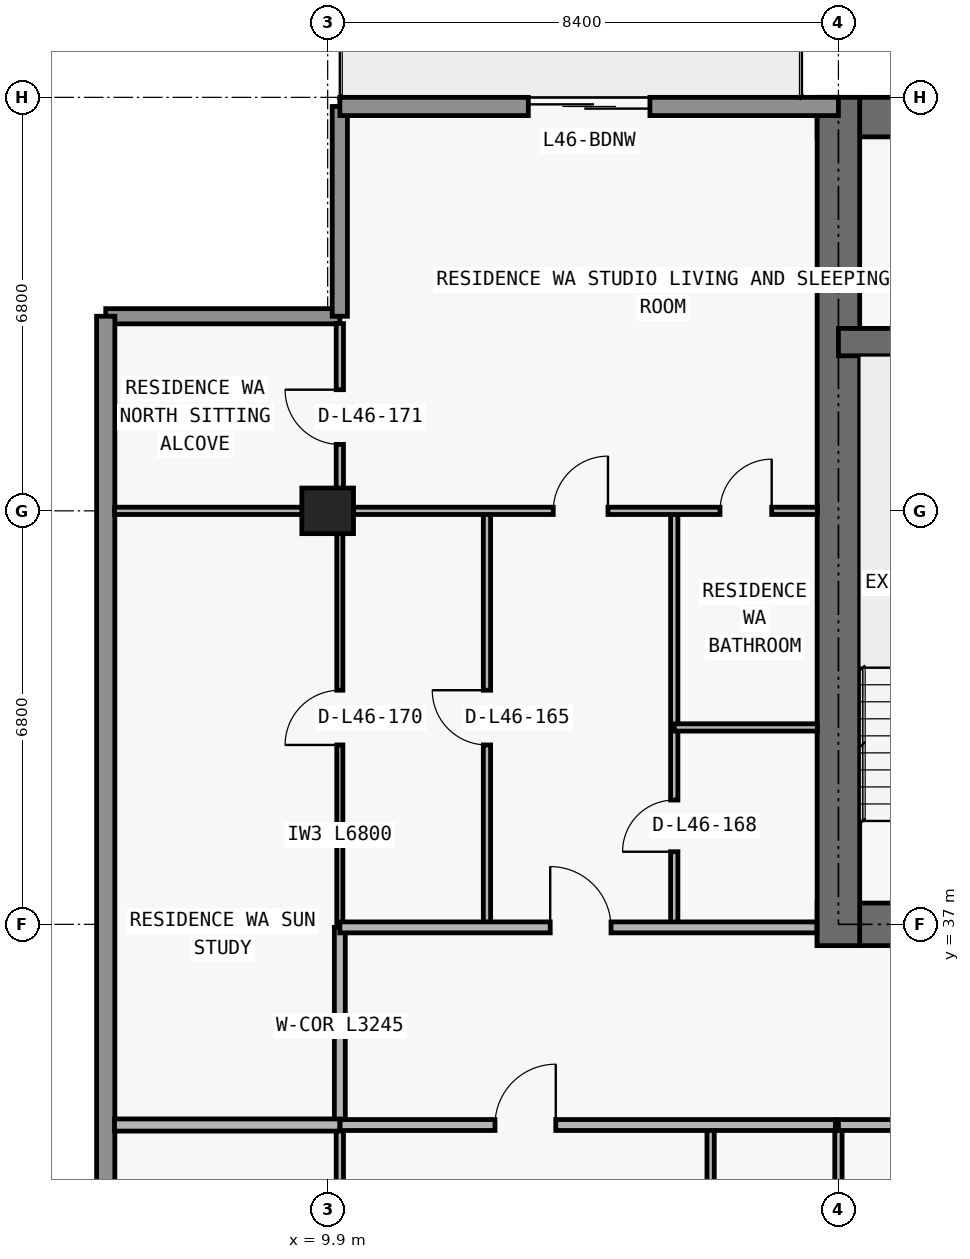
"""IFC4 building model, lengths in metres.
Left out: names, types, materials, properties, quantities, classifications, styles, units other than length and angle.
Written with IfcOpenShell. Run it as: python <this file> out.ifc"""

import sys

from ifc_helpers import new_model, si_unit, direction, frame, frame_2d, origin, origin_2d, place, context, subcontext, project, spatial, rectangle, extrude, element, fill, save


model = new_model("IFC4")
c1 = context("Model", 3, precision=1e-05, world=origin(), true_north=direction((0.0, 1.0)))
c2 = subcontext(c1, "Body", "Model", "MODEL_VIEW")
j1 = project(units=[si_unit("LENGTHUNIT", "METRE"), si_unit("PLANEANGLEUNIT", "RADIAN")], contexts=[c1])
p1 = place(None, origin())
s1 = spatial("IfcSite", under=j1, at=p1, CompositionType="ELEMENT")
p2 = place(p1, origin())
s2 = spatial("IfcBuilding", under=s1, at=p2, CompositionType="ELEMENT")
p3 = place(p2, frame((0.0, 0.0, 167.1)))
s3 = spatial("IfcBuildingStorey", under=s2, at=p3, CompositionType="ELEMENT", Elevation=167.1)
p4 = place(p3, frame((9.9, 43.8, 0.0), z_axis=(0.0, 0.0, 1.0), x_axis=(1.0, 0.0, 0.0)))
e1 = element("IfcColumn", 1, at=p4, inside=s3, PredefinedType="COLUMN", context=c2, shape_type="SweptSolid", body=[
    extrude(rectangle(XDim=0.85, YDim=0.75, at=origin_2d()), origin(), (0.0, 0.0, 1.0), 3.05),
])
p5 = place(p3, frame((17.95, 37.0, 0.0), z_axis=(0.0, 0.0, 1.0), x_axis=(1.0, 0.0, 0.0)))
e2 = element("IfcWall", 2, at=p5, inside=s3, PredefinedType="SHEAR", context=c2, shape_type="SweptSolid", body=[
    extrude(rectangle(XDim=41.9, YDim=0.7, at=frame_2d((20.95, 0.0))), origin(), (0.0, 0.0, 1.0), 3.05),
])
p6 = place(p5, frame((14.35, 0.0, 0.0)))
e3 = element("IfcOpeningElement", 3, at=p6, cuts=e2, PredefinedType="OPENING", context=c2, shape_type="SweptSolid", body=[
    extrude(rectangle(XDim=1.1, YDim=2.15, at=frame_2d((0.55, 1.075))), frame((0.0, 0.36, 0.0), z_axis=(0.0, -1.0, 0.0), x_axis=(1.0, 0.0, 0.0)), (0.0, 0.0, 1.0), 0.72),
])
p7 = place(p5, frame((6.2, 0.0, 0.0)))
e4 = element("IfcOpeningElement", 4, at=p7, cuts=e2, PredefinedType="OPENING", context=c2, shape_type="SweptSolid", body=[
    extrude(rectangle(XDim=1.05, YDim=2.15, at=frame_2d((0.525, 1.075))), frame((0.0, 0.36, 0.0), z_axis=(0.0, -1.0, 0.0), x_axis=(1.0, 0.0, 0.0)), (0.0, 0.0, 1.0), 0.72),
])
p8 = place(p5, frame((34.7, 0.0, 0.0)))
e5 = element("IfcOpeningElement", 5, at=p8, cuts=e2, PredefinedType="OPENING", context=c2, shape_type="SweptSolid", body=[
    extrude(rectangle(XDim=1.05, YDim=2.15, at=frame_2d((0.525, 1.075))), frame((0.0, 0.36, 0.0), z_axis=(0.0, -1.0, 0.0), x_axis=(1.0, 0.0, 0.0)), (0.0, 0.0, 1.0), 0.72),
])
p9 = place(p5, frame((10.812, 0.0, 0.0)))
e6 = element("IfcOpeningElement", 6, at=p9, cuts=e2, PredefinedType="OPENING", context=c2, shape_type="SweptSolid", body=[
    extrude(rectangle(XDim=1.05, YDim=2.15, at=frame_2d((0.525, 1.075))), frame((0.0, 0.36, 0.0), z_axis=(0.0, -1.0, 0.0), x_axis=(1.0, 0.0, 0.0)), (0.0, 0.0, 1.0), 0.72),
])
p10 = place(p5, frame((24.05, 0.0, 0.0)))
e7 = element("IfcOpeningElement", 7, at=p10, cuts=e2, PredefinedType="OPENING", context=c2, shape_type="SweptSolid", body=[
    extrude(rectangle(XDim=1.05, YDim=2.15, at=frame_2d((0.525, 1.075))), frame((0.0, 0.36, 0.0), z_axis=(0.0, -1.0, 0.0), x_axis=(1.0, 0.0, 0.0)), (0.0, 0.0, 1.0), 0.72),
])
p11 = place(p3, frame((17.95, 50.275, 0.0), z_axis=(0.0, 0.0, 1.0), x_axis=(1.0, 0.0, 0.0)))
e8 = element("IfcWall", 8, at=p11, inside=s3, PredefinedType="SHEAR", context=c2, shape_type="SweptSolid", body=[
    extrude(rectangle(XDim=41.9, YDim=0.65, at=frame_2d((20.95, 0.0))), origin(), (0.0, 0.0, 1.0), 3.05),
])
p12 = place(p3, frame((18.3, 36.65, 0.0), z_axis=(0.0, 0.0, 1.0), x_axis=(0.0, 1.0, 0.0)))
e9 = element("IfcWall", 9, at=p12, inside=s3, PredefinedType="SHEAR", context=c2, shape_type="SweptSolid", body=[
    extrude(rectangle(XDim=13.95, YDim=0.7, at=frame_2d((6.975, 0.0))), origin(), (0.0, 0.0, 1.0), 3.05),
])
p13 = place(p3, frame((18.3, 46.575, 0.0), z_axis=(0.0, 0.0, 1.0), x_axis=(1.0, 0.0, 0.0)))
e10 = element("IfcWall", 10, at=p13, inside=s3, PredefinedType="SHEAR", context=c2, shape_type="SweptSolid", body=[
    extrude(rectangle(XDim=41.2, YDim=0.45, at=frame_2d((20.6, 0.0))), origin(), (0.0, 0.0, 1.0), 3.05),
])
p14 = place(p13, frame((7.575, 0.0, 0.0)))
e11 = element("IfcOpeningElement", 11, at=p14, cuts=e10, PredefinedType="OPENING", context=c2, shape_type="SweptSolid", body=[
    extrude(rectangle(XDim=1.05, YDim=2.15, at=frame_2d((0.525, 1.075))), frame((0.0, 0.235, 0.0), z_axis=(0.0, -1.0, 0.0), x_axis=(1.0, 0.0, 0.0)), (0.0, 0.0, 1.0), 0.47),
])
p15 = place(p13, frame((32.625, 0.0, 0.0)))
e12 = element("IfcOpeningElement", 12, at=p15, cuts=e10, PredefinedType="OPENING", context=c2, shape_type="SweptSolid", body=[
    extrude(rectangle(XDim=1.05, YDim=2.15, at=frame_2d((0.525, 1.075))), frame((0.0, 0.235, 0.0), z_axis=(0.0, -1.0, 0.0), x_axis=(1.0, 0.0, 0.0)), (0.0, 0.0, 1.0), 0.47),
])
p16 = place(p3, frame((6.25, 47.0, 0.0), z_axis=(0.0, 0.0, 1.0), x_axis=(1.0, 0.0, 0.0)))
e13 = element("IfcWall", 13, at=p16, inside=s3, PredefinedType="ELEMENTEDWALL", context=c2, shape_type="SweptSolid", body=[
    extrude(rectangle(XDim=3.85, YDim=0.25, at=frame_2d((1.925, 0.0))), origin(), (0.0, 0.0, 1.0), 3.05),
])
p17 = place(p3, frame((10.1, 47.0, 0.0), z_axis=(0.0, 0.0, 1.0), x_axis=(0.0, 1.0, 0.0)))
e14 = element("IfcWall", 14, at=p17, inside=s3, PredefinedType="ELEMENTEDWALL", context=c2, shape_type="SweptSolid", body=[
    extrude(rectangle(XDim=3.45, YDim=0.25, at=frame_2d((1.725, 0.0))), origin(), (0.0, 0.0, 1.0), 3.05),
])
p18 = place(p3, frame((6.25, 29.1, 0.0), z_axis=(0.0, 0.0, 1.0), x_axis=(0.0, 1.0, 0.0)))
e15 = element("IfcWall", 15, at=p18, inside=s3, PredefinedType="STANDARD", context=c2, shape_type="SweptSolid", body=[
    extrude(rectangle(XDim=17.9, YDim=0.3, at=frame_2d((8.95, 0.0))), origin(), (0.0, 0.0, 1.0), 3.05),
])
p19 = place(p3, frame((10.1, 50.45, 0.0), z_axis=(0.0, 0.0, 1.0), x_axis=(1.0, 0.0, 0.0)))
e16 = element("IfcWall", 16, at=p19, inside=s3, PredefinedType="STANDARD", context=c2, shape_type="SweptSolid", body=[
    extrude(rectangle(XDim=8.2, YDim=0.3, at=frame_2d((4.1, 0.0))), origin(), (0.0, 0.0, 1.0), 3.05),
])
p20 = place(p19, frame((3.1, 0.0, 0.0)))
e17 = element("IfcOpeningElement", 17, at=p20, cuts=e16, PredefinedType="OPENING", context=c2, shape_type="SweptSolid", body=[
    extrude(rectangle(XDim=2.0, YDim=2.3, at=frame_2d((1.0, 1.15))), frame((0.0, 0.16, 0.0), z_axis=(0.0, -1.0, 0.0), x_axis=(1.0, 0.0, 0.0)), (0.0, 0.0, 1.0), 0.32),
])
p21 = place(p3, frame((10.1, 29.44, 0.0), z_axis=(0.0, 0.0, 1.0), x_axis=(0.0, 1.0, 0.0)))
e18 = element("IfcWall", 18, at=p21, inside=s3, PredefinedType="PARTITIONING", context=c2, shape_type="SweptSolid", body=[
    extrude(rectangle(XDim=4.26, YDim=0.12, at=frame_2d((2.13, 0.0))), origin(), (0.0, 0.0, 1.0), 2.263),
])
p22 = place(p3, frame((10.1, 33.705, 0.0), z_axis=(0.0, 0.0, 1.0), x_axis=(0.0, 1.0, 0.0)))
e19 = element("IfcWall", 19, at=p22, inside=s3, PredefinedType="PARTITIONING", context=c2, shape_type="SweptSolid", body=[
    extrude(rectangle(XDim=3.245, YDim=0.18, at=frame_2d((1.623, 0.0))), origin(), (0.0, 0.0, 1.0), 2.263),
])
p23 = place(p3, frame((10.1, 37.0, 0.0), z_axis=(0.0, 0.0, 1.0), x_axis=(0.0, 1.0, 0.0)))
e20 = element("IfcWall", 20, at=p23, inside=s3, PredefinedType="MOVABLE", context=c2, shape_type="SweptSolid", body=[
    extrude(rectangle(XDim=6.8, YDim=0.1, at=frame_2d((3.4, 0.0))), origin(), (0.0, 0.0, 1.0), 2.263),
])
p24 = place(p23, frame((2.95, 0.0, 0.0)))
e21 = element("IfcOpeningElement", 21, at=p24, cuts=e20, PredefinedType="OPENING", context=c2, shape_type="SweptSolid", body=[
    extrude(rectangle(XDim=0.9, YDim=2.15, at=frame_2d((0.45, 1.075))), frame((0.0, 0.06, 0.0), z_axis=(0.0, -1.0, 0.0), x_axis=(1.0, 0.0, 0.0)), (0.0, 0.0, 1.0), 0.12),
])
p25 = place(p3, frame((10.1, 43.805, 0.0), z_axis=(0.0, 0.0, 1.0), x_axis=(0.0, 1.0, 0.0)))
e22 = element("IfcWall", 22, at=p25, inside=s3, PredefinedType="PARTITIONING", context=c2, shape_type="SweptSolid", body=[
    extrude(rectangle(XDim=3.075, YDim=0.12, at=frame_2d((1.538, 0.0))), origin(), (0.0, 0.0, 1.0), 3.05),
])
p26 = place(p25, frame((1.087, 0.0, 0.0)))
e23 = element("IfcOpeningElement", 23, at=p26, cuts=e22, PredefinedType="OPENING", context=c2, shape_type="SweptSolid", body=[
    extrude(rectangle(XDim=0.9, YDim=2.15, at=frame_2d((0.45, 1.075))), frame((0.0, 0.07, 0.0), z_axis=(0.0, -1.0, 0.0), x_axis=(1.0, 0.0, 0.0)), (0.0, 0.0, 1.0), 0.14),
])
p27 = place(p3, frame((12.52, 37.0, 0.0), z_axis=(0.0, 0.0, 1.0), x_axis=(0.0, 1.0, 0.0)))
e24 = element("IfcWall", 24, at=p27, inside=s3, PredefinedType="PARTITIONING", context=c2, shape_type="SweptSolid", body=[
    extrude(rectangle(XDim=6.8, YDim=0.12, at=frame_2d((3.4, 0.0))), origin(), (0.0, 0.0, 1.0), 3.05),
])
p28 = place(p27, frame((2.95, 0.0, 0.0)))
e25 = element("IfcOpeningElement", 25, at=p28, cuts=e24, PredefinedType="OPENING", context=c2, shape_type="SweptSolid", body=[
    extrude(rectangle(XDim=0.9, YDim=2.15, at=frame_2d((0.45, 1.075))), frame((0.0, 0.07, 0.0), z_axis=(0.0, -1.0, 0.0), x_axis=(1.0, 0.0, 0.0)), (0.0, 0.0, 1.0), 0.14),
])
p29 = place(p3, frame((15.6, 37.0, 0.0), z_axis=(0.0, 0.0, 1.0), x_axis=(0.0, 1.0, 0.0)))
e26 = element("IfcWall", 26, at=p29, inside=s3, PredefinedType="PARTITIONING", context=c2, shape_type="SweptSolid", body=[
    extrude(rectangle(XDim=6.8, YDim=0.12, at=frame_2d((3.4, 0.0))), origin(), (0.0, 0.0, 1.0), 3.05),
])
p30 = place(p29, frame((1.194, 0.0, 0.0)))
e27 = element("IfcOpeningElement", 27, at=p30, cuts=e26, PredefinedType="OPENING", context=c2, shape_type="SweptSolid", body=[
    extrude(rectangle(XDim=0.85, YDim=2.1, at=frame_2d((0.425, 1.05))), frame((0.0, 0.07, 0.0), z_axis=(0.0, -1.0, 0.0), x_axis=(1.0, 0.0, 0.0)), (0.0, 0.0, 1.0), 0.14),
])
p31 = place(p3, frame((16.198, 29.44, 0.0), z_axis=(0.0, 0.0, 1.0), x_axis=(0.0, 1.0, 0.0)))
e28 = element("IfcWall", 28, at=p31, inside=s3, PredefinedType="PARTITIONING", context=c2, shape_type="SweptSolid", body=[
    extrude(rectangle(XDim=4.26, YDim=0.12, at=frame_2d((2.13, 0.0))), origin(), (0.0, 0.0, 1.0), 3.05),
])
p32 = place(p31, frame((1.705, 0.0, 0.0)))
e29 = element("IfcOpeningElement", 29, at=p32, cuts=e28, PredefinedType="OPENING", context=c2, shape_type="SweptSolid", body=[
    extrude(rectangle(XDim=0.85, YDim=2.1, at=frame_2d((0.425, 1.05))), frame((0.0, 0.07, 0.0), z_axis=(0.0, -1.0, 0.0), x_axis=(1.0, 0.0, 0.0)), (0.0, 0.0, 1.0), 0.14),
])
p33 = place(p3, frame((18.3, 29.44, 0.0), z_axis=(0.0, 0.0, 1.0), x_axis=(0.0, 1.0, 0.0)))
e30 = element("IfcWall", 30, at=p33, inside=s3, PredefinedType="PARTITIONING", context=c2, shape_type="SweptSolid", body=[
    extrude(rectangle(XDim=4.26, YDim=0.12, at=frame_2d((2.13, 0.0))), origin(), (0.0, 0.0, 1.0), 2.263),
])
p34 = place(p3, frame((6.395, 33.7, 0.0), z_axis=(0.0, 0.0, 1.0), x_axis=(1.0, 0.0, 0.0)))
e31 = element("IfcWall", 31, at=p34, inside=s3, PredefinedType="PARTITIONING", context=c2, shape_type="SweptSolid", body=[
    extrude(rectangle(XDim=3.705, YDim=0.2, at=frame_2d((1.853, 0.0))), origin(), (0.0, 0.0, 1.0), 3.05),
])
p35 = place(p3, frame((10.105, 33.7, 0.0), z_axis=(0.0, 0.0, 1.0), x_axis=(1.0, 0.0, 0.0)))
e32 = element("IfcWall", 32, at=p35, inside=s3, PredefinedType="PARTITIONING", context=c2, shape_type="SweptSolid", body=[
    extrude(rectangle(XDim=8.145, YDim=0.18, at=frame_2d((4.073, 0.0))), origin(), (0.0, 0.0, 1.0), 3.05),
])
p36 = place(p35, frame((2.546, 0.0, 0.0)))
e33 = element("IfcOpeningElement", 33, at=p36, cuts=e32, PredefinedType="OPENING", context=c2, shape_type="SweptSolid", body=[
    extrude(rectangle(XDim=1.0, YDim=2.2, at=frame_2d((0.5, 1.1))), frame((0.0, 0.1, 0.0), z_axis=(0.0, -1.0, 0.0), x_axis=(1.0, 0.0, 0.0)), (0.0, 0.0, 1.0), 0.2),
])
p37 = place(p3, frame((18.3, 33.7, 0.0), z_axis=(0.0, 0.0, 1.0), x_axis=(1.0, 0.0, 0.0)))
e34 = element("IfcWall", 34, at=p37, inside=s3, PredefinedType="PARTITIONING", context=c2, shape_type="SweptSolid", body=[
    extrude(rectangle(XDim=8.35, YDim=0.18, at=frame_2d((4.175, 0.0))), origin(), (0.0, 0.0, 1.0), 3.05),
])
p38 = place(p3, frame((10.1, 36.95, 0.0), z_axis=(0.0, 0.0, 1.0), x_axis=(1.0, 0.0, 0.0)))
e35 = element("IfcWall", 35, at=p38, inside=s3, PredefinedType="PARTITIONING", context=c2, shape_type="SweptSolid", body=[
    extrude(rectangle(XDim=7.845, YDim=0.18, at=frame_2d((3.922, 0.0))), origin(), (0.0, 0.0, 1.0), 3.05),
])
p39 = place(p38, frame((3.46, 0.0, 0.0)))
e36 = element("IfcOpeningElement", 36, at=p39, cuts=e35, PredefinedType="OPENING", context=c2, shape_type="SweptSolid", body=[
    extrude(rectangle(XDim=1.0, YDim=2.2, at=frame_2d((0.5, 1.1))), frame((0.0, 0.1, 0.0), z_axis=(0.0, -1.0, 0.0), x_axis=(1.0, 0.0, 0.0)), (0.0, 0.0, 1.0), 0.2),
])
p40 = place(p3, frame((15.6, 40.238, 0.0), z_axis=(0.0, 0.0, 1.0), x_axis=(1.0, 0.0, 0.0)))
e37 = element("IfcWall", 37, at=p40, inside=s3, PredefinedType="PARTITIONING", context=c2, shape_type="SweptSolid", body=[
    extrude(rectangle(XDim=2.355, YDim=0.12, at=frame_2d((1.177, 0.0))), origin(), (0.0, 0.0, 1.0), 3.05),
])
p41 = place(p3, frame((6.395, 43.8, 0.0), z_axis=(0.0, 0.0, 1.0), x_axis=(1.0, 0.0, 0.0)))
e38 = element("IfcWall", 38, at=p41, inside=s3, PredefinedType="PARTITIONING", context=c2, shape_type="SweptSolid", body=[
    extrude(rectangle(XDim=11.56, YDim=0.12, at=frame_2d((5.78, 0.0))), origin(), (0.0, 0.0, 1.0), 2.418),
])
p42 = place(p41, frame((7.215, 0.0, 0.0)))
e39 = element("IfcOpeningElement", 39, at=p42, cuts=e38, PredefinedType="OPENING", context=c2, shape_type="SweptSolid", body=[
    extrude(rectangle(XDim=0.9, YDim=2.15, at=frame_2d((0.45, 1.075))), frame((0.0, 0.07, 0.0), z_axis=(0.0, -1.0, 0.0), x_axis=(1.0, 0.0, 0.0)), (0.0, 0.0, 1.0), 0.14),
])
p43 = place(p41, frame((9.958, 0.0, 0.0)))
e40 = element("IfcOpeningElement", 40, at=p43, cuts=e38, PredefinedType="OPENING", context=c2, shape_type="SweptSolid", body=[
    extrude(rectangle(XDim=0.85, YDim=2.1, at=frame_2d((0.425, 1.05))), frame((0.0, 0.07, 0.0), z_axis=(0.0, -1.0, 0.0), x_axis=(1.0, 0.0, 0.0)), (0.0, 0.0, 1.0), 0.14),
])
p44 = place(p20, origin())
e41 = element("IfcDoor", 41, at=p44, inside=s3, OperationType="DOUBLE_DOOR_SLIDING", PredefinedType="DOOR", context=c2, shape_type="SweptSolid", body=[
    extrude(rectangle(XDim=2.0, YDim=2.3, at=frame_2d((1.0, 1.15))), frame((0.0, 0.025, 0.0), z_axis=(0.0, -1.0, 0.0), x_axis=(1.0, 0.0, 0.0)), (0.0, 0.0, 1.0), 0.05),
])
fill(e17, e41)
p45 = place(p36, origin())
e42 = element("IfcDoor", 42, at=p45, inside=s3, OperationType="SINGLE_SWING_RIGHT", PredefinedType="DOOR", context=c2, shape_type="SweptSolid", body=[
    extrude(rectangle(XDim=1.0, YDim=2.2, at=frame_2d((0.5, 1.1))), frame((0.0, 0.025, 0.0), z_axis=(0.0, -1.0, 0.0), x_axis=(1.0, 0.0, 0.0)), (0.0, 0.0, 1.0), 0.05),
])
fill(e33, e42)
p46 = place(p28, origin())
e43 = element("IfcDoor", 43, at=p46, inside=s3, OperationType="SINGLE_SWING_RIGHT", PredefinedType="DOOR", context=c2, shape_type="SweptSolid", body=[
    extrude(rectangle(XDim=0.9, YDim=2.15, at=frame_2d((0.45, 1.075))), frame((0.0, 0.025, 0.0), z_axis=(0.0, -1.0, 0.0), x_axis=(1.0, 0.0, 0.0)), (0.0, 0.0, 1.0), 0.05),
])
fill(e25, e43)
p47 = place(p39, origin())
e44 = element("IfcDoor", 44, at=p47, inside=s3, OperationType="SINGLE_SWING_LEFT", PredefinedType="DOOR", context=c2, shape_type="SweptSolid", body=[
    extrude(rectangle(XDim=1.0, YDim=2.2, at=frame_2d((0.5, 1.1))), frame((0.0, 0.025, 0.0), z_axis=(0.0, -1.0, 0.0), x_axis=(1.0, 0.0, 0.0)), (0.0, 0.0, 1.0), 0.05),
])
fill(e36, e44)
p48 = place(p42, origin())
e45 = element("IfcDoor", 45, at=p48, inside=s3, OperationType="SINGLE_SWING_RIGHT", PredefinedType="DOOR", context=c2, shape_type="SweptSolid", body=[
    extrude(rectangle(XDim=0.9, YDim=2.15, at=frame_2d((0.45, 1.075))), frame((0.0, 0.025, 0.0), z_axis=(0.0, -1.0, 0.0), x_axis=(1.0, 0.0, 0.0)), (0.0, 0.0, 1.0), 0.05),
])
fill(e39, e45)
p49 = place(p30, origin())
e46 = element("IfcDoor", 46, at=p49, inside=s3, OperationType="SINGLE_SWING_LEFT", PredefinedType="DOOR", context=c2, shape_type="SweptSolid", body=[
    extrude(rectangle(XDim=0.85, YDim=2.1, at=frame_2d((0.425, 1.05))), frame((0.0, 0.025, 0.0), z_axis=(0.0, -1.0, 0.0), x_axis=(1.0, 0.0, 0.0)), (0.0, 0.0, 1.0), 0.05),
])
fill(e27, e46)
p50 = place(p43, origin())
e47 = element("IfcDoor", 47, at=p50, inside=s3, OperationType="SINGLE_SWING_RIGHT", PredefinedType="DOOR", context=c2, shape_type="SweptSolid", body=[
    extrude(rectangle(XDim=0.85, YDim=2.1, at=frame_2d((0.425, 1.05))), frame((0.0, 0.025, 0.0), z_axis=(0.0, -1.0, 0.0), x_axis=(1.0, 0.0, 0.0)), (0.0, 0.0, 1.0), 0.05),
])
fill(e40, e47)
p51 = place(p24, origin())
e48 = element("IfcDoor", 48, at=p51, inside=s3, OperationType="SINGLE_SWING_LEFT", PredefinedType="DOOR", context=c2, shape_type="SweptSolid", body=[
    extrude(rectangle(XDim=0.9, YDim=2.15, at=frame_2d((0.45, 1.075))), frame((0.0, 0.025, 0.0), z_axis=(0.0, -1.0, 0.0), x_axis=(1.0, 0.0, 0.0)), (0.0, 0.0, 1.0), 0.05),
])
fill(e21, e48)
p52 = place(p26, origin())
e49 = element("IfcDoor", 49, at=p52, inside=s3, OperationType="SINGLE_SWING_RIGHT", PredefinedType="DOOR", context=c2, shape_type="SweptSolid", body=[
    extrude(rectangle(XDim=0.9, YDim=2.15, at=frame_2d((0.45, 1.075))), frame((0.0, 0.025, 0.0), z_axis=(0.0, -1.0, 0.0), x_axis=(1.0, 0.0, 0.0)), (0.0, 0.0, 1.0), 0.05),
])
fill(e23, e49)
save(model, sys.argv[1])
